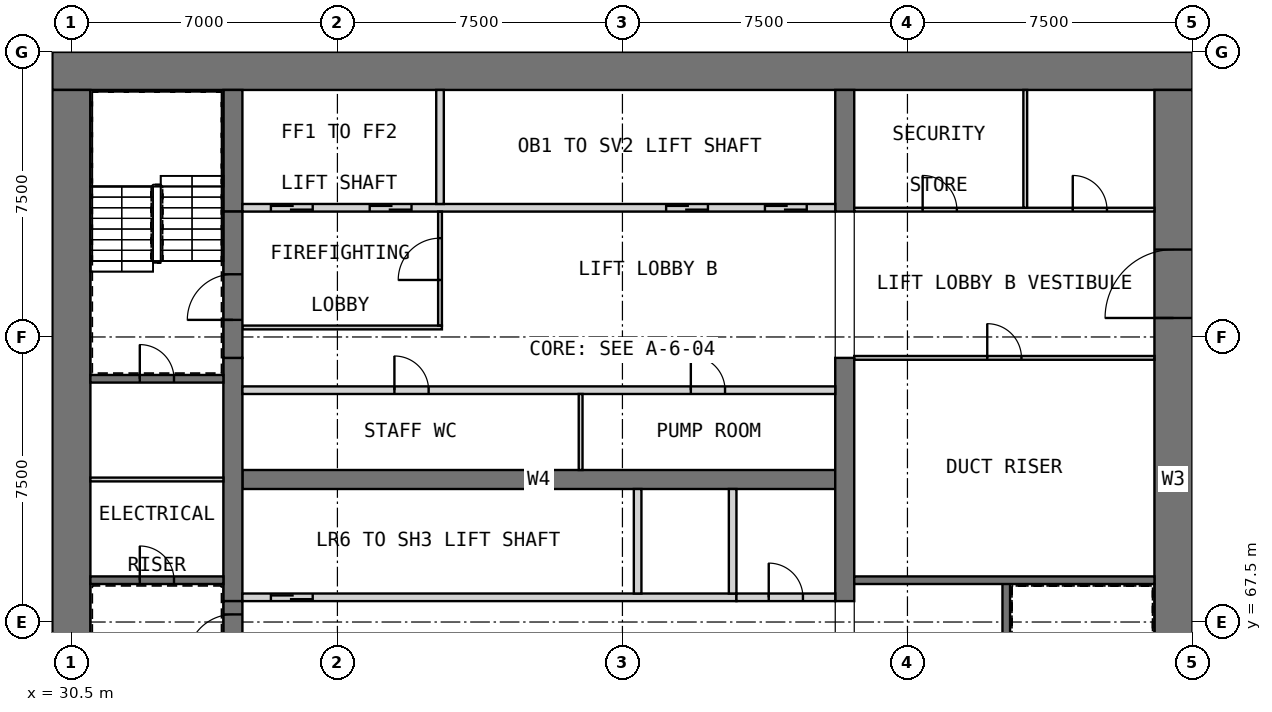
"""IFC4 building model, lengths in metres.
Left out: names, types, materials, properties, quantities, classifications, styles, units other than length and angle.
Written with IfcOpenShell. Run it as: python <this file> out.ifc"""

import sys

from ifc_helpers import new_model, si_unit, direction, frame, frame_2d, origin, place, context, subcontext, project, spatial, rectangle, extrude, element, fill, save


model = new_model("IFC4")
c1 = context("Model", 3, precision=1e-05, world=origin(), true_north=direction((0.0, 1.0)))
c2 = subcontext(c1, "Body", "Model", "MODEL_VIEW")
j1 = project(units=[si_unit("LENGTHUNIT", "METRE"), si_unit("PLANEANGLEUNIT", "RADIAN")], contexts=[c1])
p1 = place(None, origin())
s1 = spatial("IfcSite", under=j1, at=p1, CompositionType="ELEMENT")
p2 = place(p1, origin())
s2 = spatial("IfcBuilding", under=s1, at=p2, CompositionType="ELEMENT")
p3 = place(p2, frame((0.0, 0.0, 8.0)))
s3 = spatial("IfcBuildingStorey", under=s2, at=p3, CompositionType="ELEMENT", Elevation=8.0)
p4 = place(p3, frame((30.0, 82.0, 0.0), z_axis=(0.0, 0.0, 1.0), x_axis=(1.0, 0.0, 0.0)))
e1 = element("IfcWall", 1, at=p4, inside=s3, PredefinedType="SHEAR", context=c2, shape_type="SweptSolid", body=[
    extrude(rectangle(XDim=30.0, YDim=1.0, at=frame_2d((15.0, 0.0))), origin(), (0.0, 0.0, 1.0), 5.5),
])
p5 = place(p3, frame((30.5, 61.0, 0.0), z_axis=(0.0, 0.0, 1.0), x_axis=(0.0, 1.0, 0.0)))
e2 = element("IfcWall", 2, at=p5, inside=s3, PredefinedType="SHEAR", context=c2, shape_type="SweptSolid", body=[
    extrude(rectangle(XDim=20.5, YDim=1.0, at=frame_2d((10.25, 0.0))), origin(), (0.0, 0.0, 1.0), 5.5),
])
p6 = place(p3, frame((59.5, 61.0, 0.0), z_axis=(0.0, 0.0, 1.0), x_axis=(0.0, 1.0, 0.0)))
e3 = element("IfcWall", 3, at=p6, inside=s3, PredefinedType="SHEAR", context=c2, shape_type="SweptSolid", body=[
    extrude(rectangle(XDim=20.5, YDim=1.0, at=frame_2d((10.25, 0.0))), origin(), (0.0, 0.0, 1.0), 5.5),
])
p7 = place(p6, frame((14.5, 0.0, 0.0)))
e4 = element("IfcOpeningElement", 4, at=p7, cuts=e3, PredefinedType="OPENING", context=c2, shape_type="SweptSolid", body=[
    extrude(rectangle(XDim=1.8, YDim=2.1, at=frame_2d((0.9, 1.05))), frame((0.0, 0.51, 0.0), z_axis=(0.0, -1.0, 0.0), x_axis=(1.0, 0.0, 0.0)), (0.0, 0.0, 1.0), 1.02),
])
p8 = place(p3, frame((35.0, 71.25, 0.0), z_axis=(0.0, 0.0, 1.0), x_axis=(1.0, 0.0, 0.0)))
e5 = element("IfcWall", 5, at=p8, inside=s3, PredefinedType="SHEAR", context=c2, shape_type="SweptSolid", body=[
    extrude(rectangle(XDim=15.6, YDim=0.5, at=frame_2d((7.8, 0.0))), origin(), (0.0, 0.0, 1.0), 5.5),
])
p9 = place(p3, frame((34.75, 68.05, 0.0), z_axis=(0.0, 0.0, 1.0), x_axis=(0.0, 1.0, 0.0)))
e6 = element("IfcWall", 6, at=p9, inside=s3, PredefinedType="SHEAR", context=c2, shape_type="SweptSolid", body=[
    extrude(rectangle(XDim=6.4, YDim=0.5, at=frame_2d((3.2, 0.0))), origin(), (0.0, 0.0, 1.0), 5.5),
])
p10 = place(p3, frame((34.75, 78.3, 0.0), z_axis=(0.0, 0.0, 1.0), x_axis=(0.0, 1.0, 0.0)))
e7 = element("IfcWall", 7, at=p10, inside=s3, PredefinedType="SHEAR", context=c2, shape_type="SweptSolid", body=[
    extrude(rectangle(XDim=3.2, YDim=0.5, at=frame_2d((1.6, 0.0))), origin(), (0.0, 0.0, 1.0), 5.5),
])
p11 = place(p3, frame((50.85, 68.05, 0.0), z_axis=(0.0, 0.0, 1.0), x_axis=(0.0, 1.0, 0.0)))
e8 = element("IfcWall", 8, at=p11, inside=s3, PredefinedType="SHEAR", context=c2, shape_type="SweptSolid", body=[
    extrude(rectangle(XDim=6.4, YDim=0.5, at=frame_2d((3.2, 0.0))), origin(), (0.0, 0.0, 1.0), 5.5),
])
p12 = place(p3, frame((50.85, 78.3, 0.0), z_axis=(0.0, 0.0, 1.0), x_axis=(0.0, 1.0, 0.0)))
e9 = element("IfcWall", 9, at=p12, inside=s3, PredefinedType="SHEAR", context=c2, shape_type="SweptSolid", body=[
    extrude(rectangle(XDim=3.2, YDim=0.5, at=frame_2d((1.6, 0.0))), origin(), (0.0, 0.0, 1.0), 5.5),
])
p13 = place(p3, frame((35.0, 68.15, 0.0), z_axis=(0.0, 0.0, 1.0), x_axis=(1.0, 0.0, 0.0)))
e10 = element("IfcWall", 10, at=p13, inside=s3, PredefinedType="SOLIDWALL", context=c2, shape_type="SweptSolid", body=[
    extrude(rectangle(XDim=13.0, YDim=0.2, at=frame_2d((6.5, 0.0))), origin(), (0.0, 0.0, 1.0), 5.5),
])
p14 = place(p13, frame((0.75, 0.0, 0.0)))
e11 = element("IfcOpeningElement", 11, at=p14, cuts=e10, PredefinedType="OPENING", context=c2, shape_type="SweptSolid", body=[
    extrude(rectangle(XDim=1.1, YDim=2.1, at=frame_2d((0.55, 1.05))), frame((0.0, 0.11, 0.0), z_axis=(0.0, -1.0, 0.0), x_axis=(1.0, 0.0, 0.0)), (0.0, 0.0, 1.0), 0.22),
])
for number, where, z_axis, x_axis in (
    (12, (45.4, 68.25, 0.0), (0.0, 0.0, 1.0), (0.0, 1.0, 0.0)),
    (13, (47.9, 68.25, 0.0), (0.0, 0.0, 1.0), (0.0, 1.0, 0.0)),
):
    element("IfcWall", number, at=place(p3, frame(where, z_axis=z_axis, x_axis=x_axis)), inside=s3, PredefinedType="SOLIDWALL", context=c2, shape_type="SweptSolid", body=[
        extrude(rectangle(XDim=2.75, YDim=0.2, at=frame_2d((1.375, 0.0))), origin(), (0.0, 0.0, 1.0), 5.5),
    ])
p15 = place(p3, frame((48.0, 68.15, 0.0), z_axis=(0.0, 0.0, 1.0), x_axis=(1.0, 0.0, 0.0)))
e14 = element("IfcWall", 14, at=p15, inside=s3, PredefinedType="PARTITIONING", context=c2, shape_type="SweptSolid", body=[
    extrude(rectangle(XDim=2.6, YDim=0.2, at=frame_2d((1.3, 0.0))), origin(), (0.0, 0.0, 1.0), 5.2),
])
p16 = place(p15, frame((0.85, 0.0, 0.0)))
e15 = element("IfcOpeningElement", 15, at=p16, cuts=e14, PredefinedType="OPENING", context=c2, shape_type="SweptSolid", body=[
    extrude(rectangle(XDim=0.9, YDim=2.1, at=frame_2d((0.45, 1.05))), frame((0.0, 0.11, 0.0), z_axis=(0.0, -1.0, 0.0), x_axis=(1.0, 0.0, 0.0)), (0.0, 0.0, 1.0), 0.22),
])
p17 = place(p3, frame((35.0, 73.6, 0.0), z_axis=(0.0, 0.0, 1.0), x_axis=(1.0, 0.0, 0.0)))
e16 = element("IfcWall", 16, at=p17, inside=s3, PredefinedType="PARTITIONING", context=c2, shape_type="SweptSolid", body=[
    extrude(rectangle(XDim=15.6, YDim=0.2, at=frame_2d((7.8, 0.0))), origin(), (0.0, 0.0, 1.0), 5.2),
])
p18 = place(p17, frame((4.0, 0.0, 0.0)))
e17 = element("IfcOpeningElement", 17, at=p18, cuts=e16, PredefinedType="OPENING", context=c2, shape_type="SweptSolid", body=[
    extrude(rectangle(XDim=0.9, YDim=2.1, at=frame_2d((0.45, 1.05))), frame((0.0, 0.11, 0.0), z_axis=(0.0, -1.0, 0.0), x_axis=(1.0, 0.0, 0.0)), (0.0, 0.0, 1.0), 0.22),
])
p19 = place(p17, frame((11.8, 0.0, 0.0)))
e18 = element("IfcOpeningElement", 18, at=p19, cuts=e16, PredefinedType="OPENING", context=c2, shape_type="SweptSolid", body=[
    extrude(rectangle(XDim=0.9, YDim=2.1, at=frame_2d((0.45, 1.05))), frame((0.0, 0.11, 0.0), z_axis=(0.0, -1.0, 0.0), x_axis=(1.0, 0.0, 0.0)), (0.0, 0.0, 1.0), 0.22),
])
p20 = place(p3, frame((43.9, 71.5, 0.0), z_axis=(0.0, 0.0, 1.0), x_axis=(0.0, 1.0, 0.0)))
e19 = element("IfcWall", 19, at=p20, inside=s3, PredefinedType="PARTITIONING", context=c2, shape_type="SweptSolid", body=[
    extrude(rectangle(XDim=2.0, YDim=0.1, at=frame_2d((1.0, 0.0))), origin(), (0.0, 0.0, 1.0), 5.2),
])
p21 = place(p3, frame((35.0, 78.4, 0.0), z_axis=(0.0, 0.0, 1.0), x_axis=(1.0, 0.0, 0.0)))
e20 = element("IfcWall", 20, at=p21, inside=s3, PredefinedType="SOLIDWALL", context=c2, shape_type="SweptSolid", body=[
    extrude(rectangle(XDim=15.6, YDim=0.2, at=frame_2d((7.8, 0.0))), origin(), (0.0, 0.0, 1.0), 5.5),
])
p22 = place(p21, frame((0.75, 0.0, 0.0)))
e21 = element("IfcOpeningElement", 21, at=p22, cuts=e20, PredefinedType="OPENING", context=c2, shape_type="SweptSolid", body=[
    extrude(rectangle(XDim=1.1, YDim=2.1, at=frame_2d((0.55, 1.05))), frame((0.0, 0.11, 0.0), z_axis=(0.0, -1.0, 0.0), x_axis=(1.0, 0.0, 0.0)), (0.0, 0.0, 1.0), 0.22),
])
p23 = place(p21, frame((3.35, 0.0, 0.0)))
e22 = element("IfcOpeningElement", 22, at=p23, cuts=e20, PredefinedType="OPENING", context=c2, shape_type="SweptSolid", body=[
    extrude(rectangle(XDim=1.1, YDim=2.1, at=frame_2d((0.55, 1.05))), frame((0.0, 0.11, 0.0), z_axis=(0.0, -1.0, 0.0), x_axis=(1.0, 0.0, 0.0)), (0.0, 0.0, 1.0), 0.22),
])
p24 = place(p21, frame((11.15, 0.0, 0.0)))
e23 = element("IfcOpeningElement", 23, at=p24, cuts=e20, PredefinedType="OPENING", context=c2, shape_type="SweptSolid", body=[
    extrude(rectangle(XDim=1.1, YDim=2.1, at=frame_2d((0.55, 1.05))), frame((0.0, 0.11, 0.0), z_axis=(0.0, -1.0, 0.0), x_axis=(1.0, 0.0, 0.0)), (0.0, 0.0, 1.0), 0.22),
])
p25 = place(p21, frame((13.75, 0.0, 0.0)))
e24 = element("IfcOpeningElement", 24, at=p25, cuts=e20, PredefinedType="OPENING", context=c2, shape_type="SweptSolid", body=[
    extrude(rectangle(XDim=1.1, YDim=2.1, at=frame_2d((0.55, 1.05))), frame((0.0, 0.11, 0.0), z_axis=(0.0, -1.0, 0.0), x_axis=(1.0, 0.0, 0.0)), (0.0, 0.0, 1.0), 0.22),
])
p26 = place(p3, frame((40.2, 78.5, 0.0), z_axis=(0.0, 0.0, 1.0), x_axis=(0.0, 1.0, 0.0)))
e25 = element("IfcWall", 25, at=p26, inside=s3, PredefinedType="SOLIDWALL", context=c2, shape_type="SweptSolid", body=[
    extrude(rectangle(XDim=3.0, YDim=0.2, at=frame_2d((1.5, 0.0))), origin(), (0.0, 0.0, 1.0), 5.5),
])
p27 = place(p3, frame((35.0, 75.25, 0.0), z_axis=(0.0, 0.0, 1.0), x_axis=(1.0, 0.0, 0.0)))
e26 = element("IfcWall", 26, at=p27, inside=s3, PredefinedType="PARTITIONING", context=c2, shape_type="SweptSolid", body=[
    extrude(rectangle(XDim=5.25, YDim=0.1, at=frame_2d((2.625, 0.0))), origin(), (0.0, 0.0, 1.0), 5.2),
])
p28 = place(p3, frame((40.2, 75.3, 0.0), z_axis=(0.0, 0.0, 1.0), x_axis=(0.0, 1.0, 0.0)))
e27 = element("IfcWall", 27, at=p28, inside=s3, PredefinedType="PARTITIONING", context=c2, shape_type="SweptSolid", body=[
    extrude(rectangle(XDim=3.0, YDim=0.1, at=frame_2d((1.5, 0.0))), origin(), (0.0, 0.0, 1.0), 5.2),
])
p29 = place(p28, frame((1.2, 0.0, 0.0)))
e28 = element("IfcOpeningElement", 28, at=p29, cuts=e27, PredefinedType="OPENING", context=c2, shape_type="SweptSolid", body=[
    extrude(rectangle(XDim=1.1, YDim=2.1, at=frame_2d((0.55, 1.05))), frame((0.0, 0.06, 0.0), z_axis=(0.0, -1.0, 0.0), x_axis=(1.0, 0.0, 0.0)), (0.0, 0.0, 1.0), 0.12),
])
p30 = place(p3, frame((34.75, 64.2, 0.0), z_axis=(0.0, 0.0, 1.0), x_axis=(0.0, 1.0, 0.0)))
e29 = element("IfcWall", 29, at=p30, inside=s3, PredefinedType="SOLIDWALL", context=c2, shape_type="SweptSolid", body=[
    extrude(rectangle(XDim=3.85, YDim=0.5, at=frame_2d((1.925, 0.0))), origin(), (0.0, 0.0, 1.0), 4.3),
])
p31 = place(p30, frame((2.3, 0.0, 0.0)))
e30 = element("IfcOpeningElement", 30, at=p31, cuts=e29, PredefinedType="OPENING", context=c2, shape_type="SweptSolid", body=[
    extrude(rectangle(XDim=1.2, YDim=2.1, at=frame_2d((0.6, 1.05))), frame((0.0, 0.26, 0.0), z_axis=(0.0, -1.0, 0.0), x_axis=(1.0, 0.0, 0.0)), (0.0, 0.0, 1.0), 0.52),
])
p32 = place(p3, frame((34.75, 74.45, 0.0), z_axis=(0.0, 0.0, 1.0), x_axis=(0.0, 1.0, 0.0)))
e31 = element("IfcWall", 31, at=p32, inside=s3, PredefinedType="SOLIDWALL", context=c2, shape_type="SweptSolid", body=[
    extrude(rectangle(XDim=3.85, YDim=0.5, at=frame_2d((1.925, 0.0))), origin(), (0.0, 0.0, 1.0), 4.3),
])
p33 = place(p32, frame((1.0, 0.0, 0.0)))
e32 = element("IfcOpeningElement", 32, at=p33, cuts=e31, PredefinedType="OPENING", context=c2, shape_type="SweptSolid", body=[
    extrude(rectangle(XDim=1.2, YDim=2.1, at=frame_2d((0.6, 1.05))), frame((0.0, 0.26, 0.0), z_axis=(0.0, -1.0, 0.0), x_axis=(1.0, 0.0, 0.0)), (0.0, 0.0, 1.0), 0.52),
])
p34 = place(p3, frame((31.0, 68.6, 0.0), z_axis=(0.0, 0.0, 1.0), x_axis=(1.0, 0.0, 0.0)))
e33 = element("IfcWall", 33, at=p34, inside=s3, PredefinedType="SOLIDWALL", context=c2, shape_type="SweptSolid", body=[
    extrude(rectangle(XDim=3.5, YDim=0.2, at=frame_2d((1.75, 0.0))), origin(), (0.0, 0.0, 1.0), 5.2),
])
p35 = place(p34, frame((1.3, 0.0, 0.0)))
e34 = element("IfcOpeningElement", 34, at=p35, cuts=e33, PredefinedType="OPENING", context=c2, shape_type="SweptSolid", body=[
    extrude(rectangle(XDim=0.9, YDim=2.1, at=frame_2d((0.45, 1.05))), frame((0.0, 0.11, 0.0), z_axis=(0.0, -1.0, 0.0), x_axis=(1.0, 0.0, 0.0)), (0.0, 0.0, 1.0), 0.22),
])
p36 = place(p3, frame((31.0, 73.9, 0.0), z_axis=(0.0, 0.0, 1.0), x_axis=(1.0, 0.0, 0.0)))
e35 = element("IfcWall", 35, at=p36, inside=s3, PredefinedType="SOLIDWALL", context=c2, shape_type="SweptSolid", body=[
    extrude(rectangle(XDim=3.5, YDim=0.2, at=frame_2d((1.75, 0.0))), origin(), (0.0, 0.0, 1.0), 5.2),
])
p37 = place(p36, frame((1.3, 0.0, 0.0)))
e36 = element("IfcOpeningElement", 36, at=p37, cuts=e35, PredefinedType="OPENING", context=c2, shape_type="SweptSolid", body=[
    extrude(rectangle(XDim=0.9, YDim=2.1, at=frame_2d((0.45, 1.05))), frame((0.0, 0.11, 0.0), z_axis=(0.0, -1.0, 0.0), x_axis=(1.0, 0.0, 0.0)), (0.0, 0.0, 1.0), 0.22),
])
p38 = place(p3, frame((55.1, 61.0, 0.0), z_axis=(0.0, 0.0, 1.0), x_axis=(0.0, 1.0, 0.0)))
e37 = element("IfcWall", 37, at=p38, inside=s3, PredefinedType="SOLIDWALL", context=c2, shape_type="SweptSolid", body=[
    extrude(rectangle(XDim=7.6, YDim=0.2, at=frame_2d((3.8, 0.0))), origin(), (0.0, 0.0, 1.0), 5.2),
])
p39 = place(p3, frame((51.1, 68.6, 0.0), z_axis=(0.0, 0.0, 1.0), x_axis=(1.0, 0.0, 0.0)))
e38 = element("IfcWall", 38, at=p39, inside=s3, PredefinedType="SOLIDWALL", context=c2, shape_type="SweptSolid", body=[
    extrude(rectangle(XDim=7.9, YDim=0.2, at=frame_2d((3.95, 0.0))), origin(), (0.0, 0.0, 1.0), 5.2),
])
p40 = place(p3, frame((31.0, 71.25, 0.0), z_axis=(0.0, 0.0, 1.0), x_axis=(1.0, 0.0, 0.0)))
e39 = element("IfcWall", 39, at=p40, inside=s3, PredefinedType="PARTITIONING", context=c2, shape_type="SweptSolid", body=[
    extrude(rectangle(XDim=3.5, YDim=0.1, at=frame_2d((1.75, 0.0))), origin(), (0.0, 0.0, 1.0), 5.2),
])
p41 = place(p3, frame((51.1, 74.45, 0.0), z_axis=(0.0, 0.0, 1.0), x_axis=(1.0, 0.0, 0.0)))
e40 = element("IfcWall", 40, at=p41, inside=s3, PredefinedType="PARTITIONING", context=c2, shape_type="SweptSolid", body=[
    extrude(rectangle(XDim=7.9, YDim=0.1, at=frame_2d((3.95, 0.0))), origin(), (0.0, 0.0, 1.0), 5.2),
])
p42 = place(p41, frame((3.5, 0.0, 0.0)))
e41 = element("IfcOpeningElement", 41, at=p42, cuts=e40, PredefinedType="OPENING", context=c2, shape_type="SweptSolid", body=[
    extrude(rectangle(XDim=0.9, YDim=2.1, at=frame_2d((0.45, 1.05))), frame((0.0, 0.06, 0.0), z_axis=(0.0, -1.0, 0.0), x_axis=(1.0, 0.0, 0.0)), (0.0, 0.0, 1.0), 0.12),
])
p43 = place(p3, frame((51.1, 78.35, 0.0), z_axis=(0.0, 0.0, 1.0), x_axis=(1.0, 0.0, 0.0)))
e42 = element("IfcWall", 42, at=p43, inside=s3, PredefinedType="PARTITIONING", context=c2, shape_type="SweptSolid", body=[
    extrude(rectangle(XDim=7.9, YDim=0.1, at=frame_2d((3.95, 0.0))), origin(), (0.0, 0.0, 1.0), 5.2),
])
p44 = place(p43, frame((1.8, 0.0, 0.0)))
e43 = element("IfcOpeningElement", 43, at=p44, cuts=e42, PredefinedType="OPENING", context=c2, shape_type="SweptSolid", body=[
    extrude(rectangle(XDim=0.9, YDim=2.1, at=frame_2d((0.45, 1.05))), frame((0.0, 0.06, 0.0), z_axis=(0.0, -1.0, 0.0), x_axis=(1.0, 0.0, 0.0)), (0.0, 0.0, 1.0), 0.12),
])
p45 = place(p43, frame((5.75, 0.0, 0.0)))
e44 = element("IfcOpeningElement", 44, at=p45, cuts=e42, PredefinedType="OPENING", context=c2, shape_type="SweptSolid", body=[
    extrude(rectangle(XDim=0.9, YDim=2.1, at=frame_2d((0.45, 1.05))), frame((0.0, 0.06, 0.0), z_axis=(0.0, -1.0, 0.0), x_axis=(1.0, 0.0, 0.0)), (0.0, 0.0, 1.0), 0.12),
])
p46 = place(p3, frame((55.6, 78.4, 0.0), z_axis=(0.0, 0.0, 1.0), x_axis=(0.0, 1.0, 0.0)))
e45 = element("IfcWall", 45, at=p46, inside=s3, PredefinedType="PARTITIONING", context=c2, shape_type="SweptSolid", body=[
    extrude(rectangle(XDim=3.1, YDim=0.1, at=frame_2d((1.55, 0.0))), origin(), (0.0, 0.0, 1.0), 5.2),
])
p47 = place(p14, origin())
e46 = element("IfcDoor", 46, at=p47, inside=s3, OperationType="DOUBLE_DOOR_SLIDING", PredefinedType="DOOR", context=c2, shape_type="SweptSolid", body=[
    extrude(rectangle(XDim=1.1, YDim=2.1, at=frame_2d((0.55, 1.05))), frame((0.0, 0.025, 0.0), z_axis=(0.0, -1.0, 0.0), x_axis=(1.0, 0.0, 0.0)), (0.0, 0.0, 1.0), 0.05),
])
fill(e11, e46)
p48 = place(p16, origin())
e47 = element("IfcDoor", 47, at=p48, inside=s3, OperationType="SINGLE_SWING_LEFT", PredefinedType="DOOR", context=c2, shape_type="SweptSolid", body=[
    extrude(rectangle(XDim=0.9, YDim=2.1, at=frame_2d((0.45, 1.05))), frame((0.0, 0.025, 0.0), z_axis=(0.0, -1.0, 0.0), x_axis=(1.0, 0.0, 0.0)), (0.0, 0.0, 1.0), 0.05),
])
fill(e15, e47)
p49 = place(p18, origin())
e48 = element("IfcDoor", 48, at=p49, inside=s3, OperationType="SINGLE_SWING_LEFT", PredefinedType="DOOR", context=c2, shape_type="SweptSolid", body=[
    extrude(rectangle(XDim=0.9, YDim=2.1, at=frame_2d((0.45, 1.05))), frame((0.0, 0.025, 0.0), z_axis=(0.0, -1.0, 0.0), x_axis=(1.0, 0.0, 0.0)), (0.0, 0.0, 1.0), 0.05),
])
fill(e17, e48)
p50 = place(p19, origin())
e49 = element("IfcDoor", 49, at=p50, inside=s3, OperationType="SINGLE_SWING_RIGHT", PredefinedType="DOOR", context=c2, shape_type="SweptSolid", body=[
    extrude(rectangle(XDim=0.9, YDim=2.1, at=frame_2d((0.45, 1.05))), frame((0.0, 0.025, 0.0), z_axis=(0.0, -1.0, 0.0), x_axis=(1.0, 0.0, 0.0)), (0.0, 0.0, 1.0), 0.05),
])
fill(e18, e49)
p51 = place(p22, origin())
e50 = element("IfcDoor", 50, at=p51, inside=s3, OperationType="DOUBLE_DOOR_SLIDING", PredefinedType="DOOR", context=c2, shape_type="SweptSolid", body=[
    extrude(rectangle(XDim=1.1, YDim=2.1, at=frame_2d((0.55, 1.05))), frame((0.0, 0.025, 0.0), z_axis=(0.0, -1.0, 0.0), x_axis=(1.0, 0.0, 0.0)), (0.0, 0.0, 1.0), 0.05),
])
fill(e21, e50)
p52 = place(p23, origin())
e51 = element("IfcDoor", 51, at=p52, inside=s3, OperationType="DOUBLE_DOOR_SLIDING", PredefinedType="DOOR", context=c2, shape_type="SweptSolid", body=[
    extrude(rectangle(XDim=1.1, YDim=2.1, at=frame_2d((0.55, 1.05))), frame((0.0, 0.025, 0.0), z_axis=(0.0, -1.0, 0.0), x_axis=(1.0, 0.0, 0.0)), (0.0, 0.0, 1.0), 0.05),
])
fill(e22, e51)
p53 = place(p24, origin())
e52 = element("IfcDoor", 52, at=p53, inside=s3, OperationType="DOUBLE_DOOR_SLIDING", PredefinedType="DOOR", context=c2, shape_type="SweptSolid", body=[
    extrude(rectangle(XDim=1.1, YDim=2.1, at=frame_2d((0.55, 1.05))), frame((0.0, 0.025, 0.0), z_axis=(0.0, -1.0, 0.0), x_axis=(1.0, 0.0, 0.0)), (0.0, 0.0, 1.0), 0.05),
])
fill(e23, e52)
p54 = place(p25, origin())
e53 = element("IfcDoor", 53, at=p54, inside=s3, OperationType="DOUBLE_DOOR_SLIDING", PredefinedType="DOOR", context=c2, shape_type="SweptSolid", body=[
    extrude(rectangle(XDim=1.1, YDim=2.1, at=frame_2d((0.55, 1.05))), frame((0.0, 0.025, 0.0), z_axis=(0.0, -1.0, 0.0), x_axis=(1.0, 0.0, 0.0)), (0.0, 0.0, 1.0), 0.05),
])
fill(e24, e53)
p55 = place(p7, origin())
e54 = element("IfcDoor", 54, at=p55, inside=s3, OperationType="DOUBLE_DOOR_SINGLE_SWING", PredefinedType="DOOR", context=c2, shape_type="SweptSolid", body=[
    extrude(rectangle(XDim=1.8, YDim=2.1, at=frame_2d((0.9, 1.05))), frame((0.0, 0.025, 0.0), z_axis=(0.0, -1.0, 0.0), x_axis=(1.0, 0.0, 0.0)), (0.0, 0.0, 1.0), 0.05),
])
fill(e4, e54)
p56 = place(p29, origin())
e55 = element("IfcDoor", 55, at=p56, inside=s3, OperationType="SINGLE_SWING_LEFT", PredefinedType="DOOR", context=c2, shape_type="SweptSolid", body=[
    extrude(rectangle(XDim=1.1, YDim=2.1, at=frame_2d((0.55, 1.05))), frame((0.0, 0.025, 0.0), z_axis=(0.0, -1.0, 0.0), x_axis=(1.0, 0.0, 0.0)), (0.0, 0.0, 1.0), 0.05),
])
fill(e28, e55)
p57 = place(p31, origin())
e56 = element("IfcDoor", 56, at=p57, inside=s3, OperationType="SINGLE_SWING_LEFT", PredefinedType="DOOR", context=c2, shape_type="SweptSolid", body=[
    extrude(rectangle(XDim=1.2, YDim=2.1, at=frame_2d((0.6, 1.05))), frame((0.0, 0.025, 0.0), z_axis=(0.0, -1.0, 0.0), x_axis=(1.0, 0.0, 0.0)), (0.0, 0.0, 1.0), 0.05),
])
fill(e30, e56)
p58 = place(p33, origin())
e57 = element("IfcDoor", 57, at=p58, inside=s3, OperationType="SINGLE_SWING_RIGHT", PredefinedType="DOOR", context=c2, shape_type="SweptSolid", body=[
    extrude(rectangle(XDim=1.2, YDim=2.1, at=frame_2d((0.6, 1.05))), frame((0.0, 0.025, 0.0), z_axis=(0.0, -1.0, 0.0), x_axis=(1.0, 0.0, 0.0)), (0.0, 0.0, 1.0), 0.05),
])
fill(e32, e57)
p59 = place(p35, origin())
e58 = element("IfcDoor", 58, at=p59, inside=s3, OperationType="SINGLE_SWING_LEFT", PredefinedType="DOOR", context=c2, shape_type="SweptSolid", body=[
    extrude(rectangle(XDim=0.9, YDim=2.1, at=frame_2d((0.45, 1.05))), frame((0.0, 0.025, 0.0), z_axis=(0.0, -1.0, 0.0), x_axis=(1.0, 0.0, 0.0)), (0.0, 0.0, 1.0), 0.05),
])
fill(e34, e58)
p60 = place(p37, origin())
e59 = element("IfcDoor", 59, at=p60, inside=s3, OperationType="SINGLE_SWING_RIGHT", PredefinedType="DOOR", context=c2, shape_type="SweptSolid", body=[
    extrude(rectangle(XDim=0.9, YDim=2.1, at=frame_2d((0.45, 1.05))), frame((0.0, 0.025, 0.0), z_axis=(0.0, -1.0, 0.0), x_axis=(1.0, 0.0, 0.0)), (0.0, 0.0, 1.0), 0.05),
])
fill(e36, e59)
p61 = place(p42, origin())
e60 = element("IfcDoor", 60, at=p61, inside=s3, OperationType="SINGLE_SWING_LEFT", PredefinedType="DOOR", context=c2, shape_type="SweptSolid", body=[
    extrude(rectangle(XDim=0.9, YDim=2.1, at=frame_2d((0.45, 1.05))), frame((0.0, 0.025, 0.0), z_axis=(0.0, -1.0, 0.0), x_axis=(1.0, 0.0, 0.0)), (0.0, 0.0, 1.0), 0.05),
])
fill(e41, e60)
p62 = place(p44, origin())
e61 = element("IfcDoor", 61, at=p62, inside=s3, OperationType="SINGLE_SWING_LEFT", PredefinedType="DOOR", context=c2, shape_type="SweptSolid", body=[
    extrude(rectangle(XDim=0.9, YDim=2.1, at=frame_2d((0.45, 1.05))), frame((0.0, 0.025, 0.0), z_axis=(0.0, -1.0, 0.0), x_axis=(1.0, 0.0, 0.0)), (0.0, 0.0, 1.0), 0.05),
])
fill(e43, e61)
p63 = place(p45, origin())
e62 = element("IfcDoor", 62, at=p63, inside=s3, OperationType="SINGLE_SWING_RIGHT", PredefinedType="DOOR", context=c2, shape_type="SweptSolid", body=[
    extrude(rectangle(XDim=0.9, YDim=2.1, at=frame_2d((0.45, 1.05))), frame((0.0, 0.025, 0.0), z_axis=(0.0, -1.0, 0.0), x_axis=(1.0, 0.0, 0.0)), (0.0, 0.0, 1.0), 0.05),
])
fill(e44, e62)
save(model, sys.argv[1])
